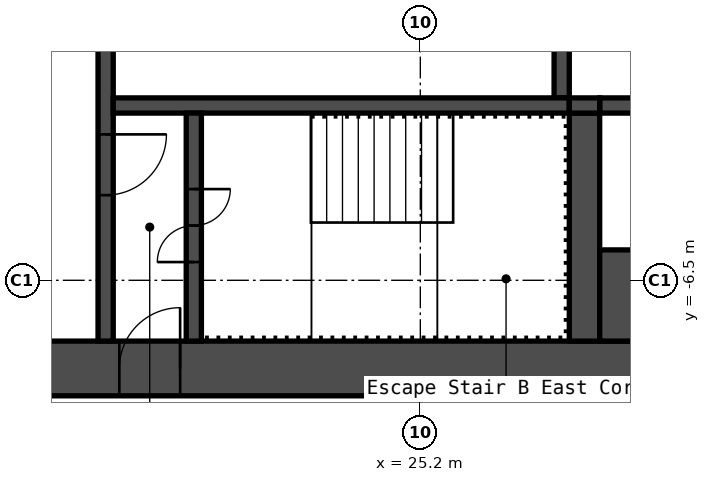
"""IFC4 building model, lengths in metres.
Left out: names, types, materials, properties, quantities, classifications, styles, units other than length and angle.
Written with IfcOpenShell. Run it as: python <this file> out.ifc"""

import sys

from ifc_helpers import new_model, si_unit, direction, frame, frame_2d, origin, place, context, subcontext, project, spatial, rectangle, extrude, element, fill, save


model = new_model("IFC4")
c1 = context("Model", 3, precision=1e-05, world=origin(), true_north=direction((0.0, 1.0)))
c2 = subcontext(c1, "Body", "Model", "MODEL_VIEW")
j1 = project(units=[si_unit("LENGTHUNIT", "METRE"), si_unit("PLANEANGLEUNIT", "RADIAN")], contexts=[c1])
p1 = place(None, origin())
s1 = spatial("IfcSite", under=j1, at=p1, CompositionType="ELEMENT")
p2 = place(p1, origin())
s2 = spatial("IfcBuilding", under=s1, at=p2, CompositionType="ELEMENT")
p3 = place(p2, frame((0.0, 0.0, 153.4)))
s3 = spatial("IfcBuildingStorey", under=s2, at=p3, CompositionType="ELEMENT", Elevation=153.4)
p4 = place(p3, frame((17.7, -7.95, 0.0), z_axis=(0.0, 0.0, 1.0), x_axis=(1.0, 0.0, 0.0)))
e1 = element("IfcWall", 1, at=p4, inside=s3, PredefinedType="SHEAR", context=c2, shape_type="SweptSolid", body=[
    extrude(rectangle(XDim=15.0, YDim=0.9, at=frame_2d((7.5, 0.0))), origin(), (0.0, 0.0, 1.0), 2.75),
])
p5 = place(p4, frame((2.55, 0.0, 0.0)))
e2 = element("IfcOpeningElement", 2, at=p5, cuts=e1, PredefinedType="OPENING", context=c2, shape_type="SweptSolid", body=[
    extrude(rectangle(XDim=1.0, YDim=2.1, at=frame_2d((0.5, 1.05))), frame((0.0, 0.46, 0.0), z_axis=(0.0, -1.0, 0.0), x_axis=(1.0, 0.0, 0.0)), (0.0, 0.0, 1.0), 0.92),
])
p6 = place(p3, frame((20.025, -7.5, 0.0), z_axis=(0.0, 0.0, 1.0), x_axis=(0.0, 1.0, 0.0)))
e3 = element("IfcWall", 3, at=p6, inside=s3, PredefinedType="SHEAR", context=c2, shape_type="SweptSolid", body=[
    extrude(rectangle(XDim=6.3, YDim=0.25, at=frame_2d((3.15, 0.0))), origin(), (0.0, 0.0, 1.0), 2.75),
])
p7 = place(p6, frame((2.4, 0.0, 0.0)))
e4 = element("IfcOpeningElement", 4, at=p7, cuts=e3, PredefinedType="OPENING", context=c2, shape_type="SweptSolid", body=[
    extrude(rectangle(XDim=1.0, YDim=2.1, at=frame_2d((0.5, 1.05))), frame((0.0, 0.135, 0.0), z_axis=(0.0, -1.0, 0.0), x_axis=(1.0, 0.0, 0.0)), (0.0, 0.0, 1.0), 0.27),
])
p8 = place(p3, frame((27.525, -3.5, 0.0), z_axis=(0.0, 0.0, 1.0), x_axis=(0.0, 1.0, 0.0)))
e5 = element("IfcWall", 5, at=p8, inside=s3, PredefinedType="SHEAR", context=c2, shape_type="SweptSolid", body=[
    extrude(rectangle(XDim=2.05, YDim=0.25, at=frame_2d((1.025, 0.0))), origin(), (0.0, 0.0, 1.0), 2.75),
])
p9 = place(p3, frame((20.15, -3.625, 0.0), z_axis=(0.0, 0.0, 1.0), x_axis=(1.0, 0.0, 0.0)))
e6 = element("IfcWall", 6, at=p9, inside=s3, PredefinedType="SHEAR", context=c2, shape_type="SweptSolid", body=[
    extrude(rectangle(XDim=7.5, YDim=0.25, at=frame_2d((3.75, 0.0))), origin(), (0.0, 0.0, 1.0), 2.75),
])
p10 = place(p3, frame((21.475, -7.5, 0.0), z_axis=(0.0, 0.0, 1.0), x_axis=(0.0, 1.0, 0.0)))
e7 = element("IfcWall", 7, at=p10, inside=s3, PredefinedType="SHEAR", context=c2, shape_type="SweptSolid", body=[
    extrude(rectangle(XDim=3.75, YDim=0.25, at=frame_2d((1.875, 0.0))), origin(), (0.0, 0.0, 1.0), 2.75),
])
p11 = place(p10, frame((1.3, 0.0, 0.0)))
e8 = element("IfcOpeningElement", 8, at=p11, cuts=e7, PredefinedType="OPENING", context=c2, shape_type="SweptSolid", body=[
    extrude(rectangle(XDim=1.2, YDim=2.1, at=frame_2d((0.6, 1.05))), frame((0.0, 0.135, 0.0), z_axis=(0.0, -1.0, 0.0), x_axis=(1.0, 0.0, 0.0)), (0.0, 0.0, 1.0), 0.27),
])
p12 = place(p3, frame((27.9, -7.5, 0.0), z_axis=(0.0, 0.0, 1.0), x_axis=(0.0, 1.0, 0.0)))
e9 = element("IfcWall", 9, at=p12, inside=s3, PredefinedType="SHEAR", context=c2, shape_type="SweptSolid", body=[
    extrude(rectangle(XDim=3.75, YDim=0.5, at=frame_2d((1.875, 0.0))), origin(), (0.0, 0.0, 1.0), 2.75),
])
p13 = place(p3, frame((28.15, -3.625, 0.0), z_axis=(0.0, 0.0, 1.0), x_axis=(1.0, 0.0, 0.0)))
e10 = element("IfcWall", 10, at=p13, inside=s3, PredefinedType="SHEAR", context=c2, shape_type="SweptSolid", body=[
    extrude(rectangle(XDim=4.55, YDim=0.25, at=frame_2d((2.275, 0.0))), origin(), (0.0, 0.0, 1.0), 2.75),
])
p14 = place(p3, frame((28.15, -6.75, 0.0), z_axis=(0.0, 0.0, 1.0), x_axis=(1.0, 0.0, 0.0)))
e11 = element("IfcWall", 11, at=p14, inside=s3, PredefinedType="SHEAR", context=c2, shape_type="SweptSolid", body=[
    extrude(rectangle(XDim=4.55, YDim=1.5, at=frame_2d((2.275, 0.0))), origin(), (0.0, 0.0, 1.0), 2.75),
])
p15 = place(p3, frame((27.65, -3.625, 0.0), z_axis=(0.0, 0.0, 1.0), x_axis=(1.0, 0.0, 0.0)))
e12 = element("IfcWall", 12, at=p15, inside=s3, PredefinedType="SHEAR", context=c2, shape_type="SweptSolid", body=[
    extrude(rectangle(XDim=0.5, YDim=0.25, at=frame_2d((0.25, 0.0))), origin(), (0.0, 0.0, 1.0), 2.75),
])
p16 = place(p5, origin())
e13 = element("IfcDoor", 13, at=p16, inside=s3, OperationType="SINGLE_SWING_LEFT", PredefinedType="DOOR", context=c2, shape_type="SweptSolid", body=[
    extrude(rectangle(XDim=1.0, YDim=2.1, at=frame_2d((0.5, 1.05))), frame((0.0, 0.025, 0.0), z_axis=(0.0, -1.0, 0.0), x_axis=(1.0, 0.0, 0.0)), (0.0, 0.0, 1.0), 0.05),
])
fill(e2, e13)
p17 = place(p11, origin())
e14 = element("IfcDoor", 14, at=p17, inside=s3, OperationType="DOUBLE_DOOR_SINGLE_SWING", PredefinedType="DOOR", context=c2, shape_type="SweptSolid", body=[
    extrude(rectangle(XDim=1.2, YDim=2.1, at=frame_2d((0.6, 1.05))), frame((0.0, 0.025, 0.0), z_axis=(0.0, -1.0, 0.0), x_axis=(1.0, 0.0, 0.0)), (0.0, 0.0, 1.0), 0.05),
])
fill(e8, e14)
p18 = place(p7, origin())
e15 = element("IfcDoor", 15, at=p18, inside=s3, OperationType="SINGLE_SWING_RIGHT", PredefinedType="DOOR", context=c2, shape_type="SweptSolid", body=[
    extrude(rectangle(XDim=1.0, YDim=2.1, at=frame_2d((0.5, 1.05))), frame((0.0, 0.025, 0.0), z_axis=(0.0, -1.0, 0.0), x_axis=(1.0, 0.0, 0.0)), (0.0, 0.0, 1.0), 0.05),
])
fill(e4, e15)
save(model, sys.argv[1])
